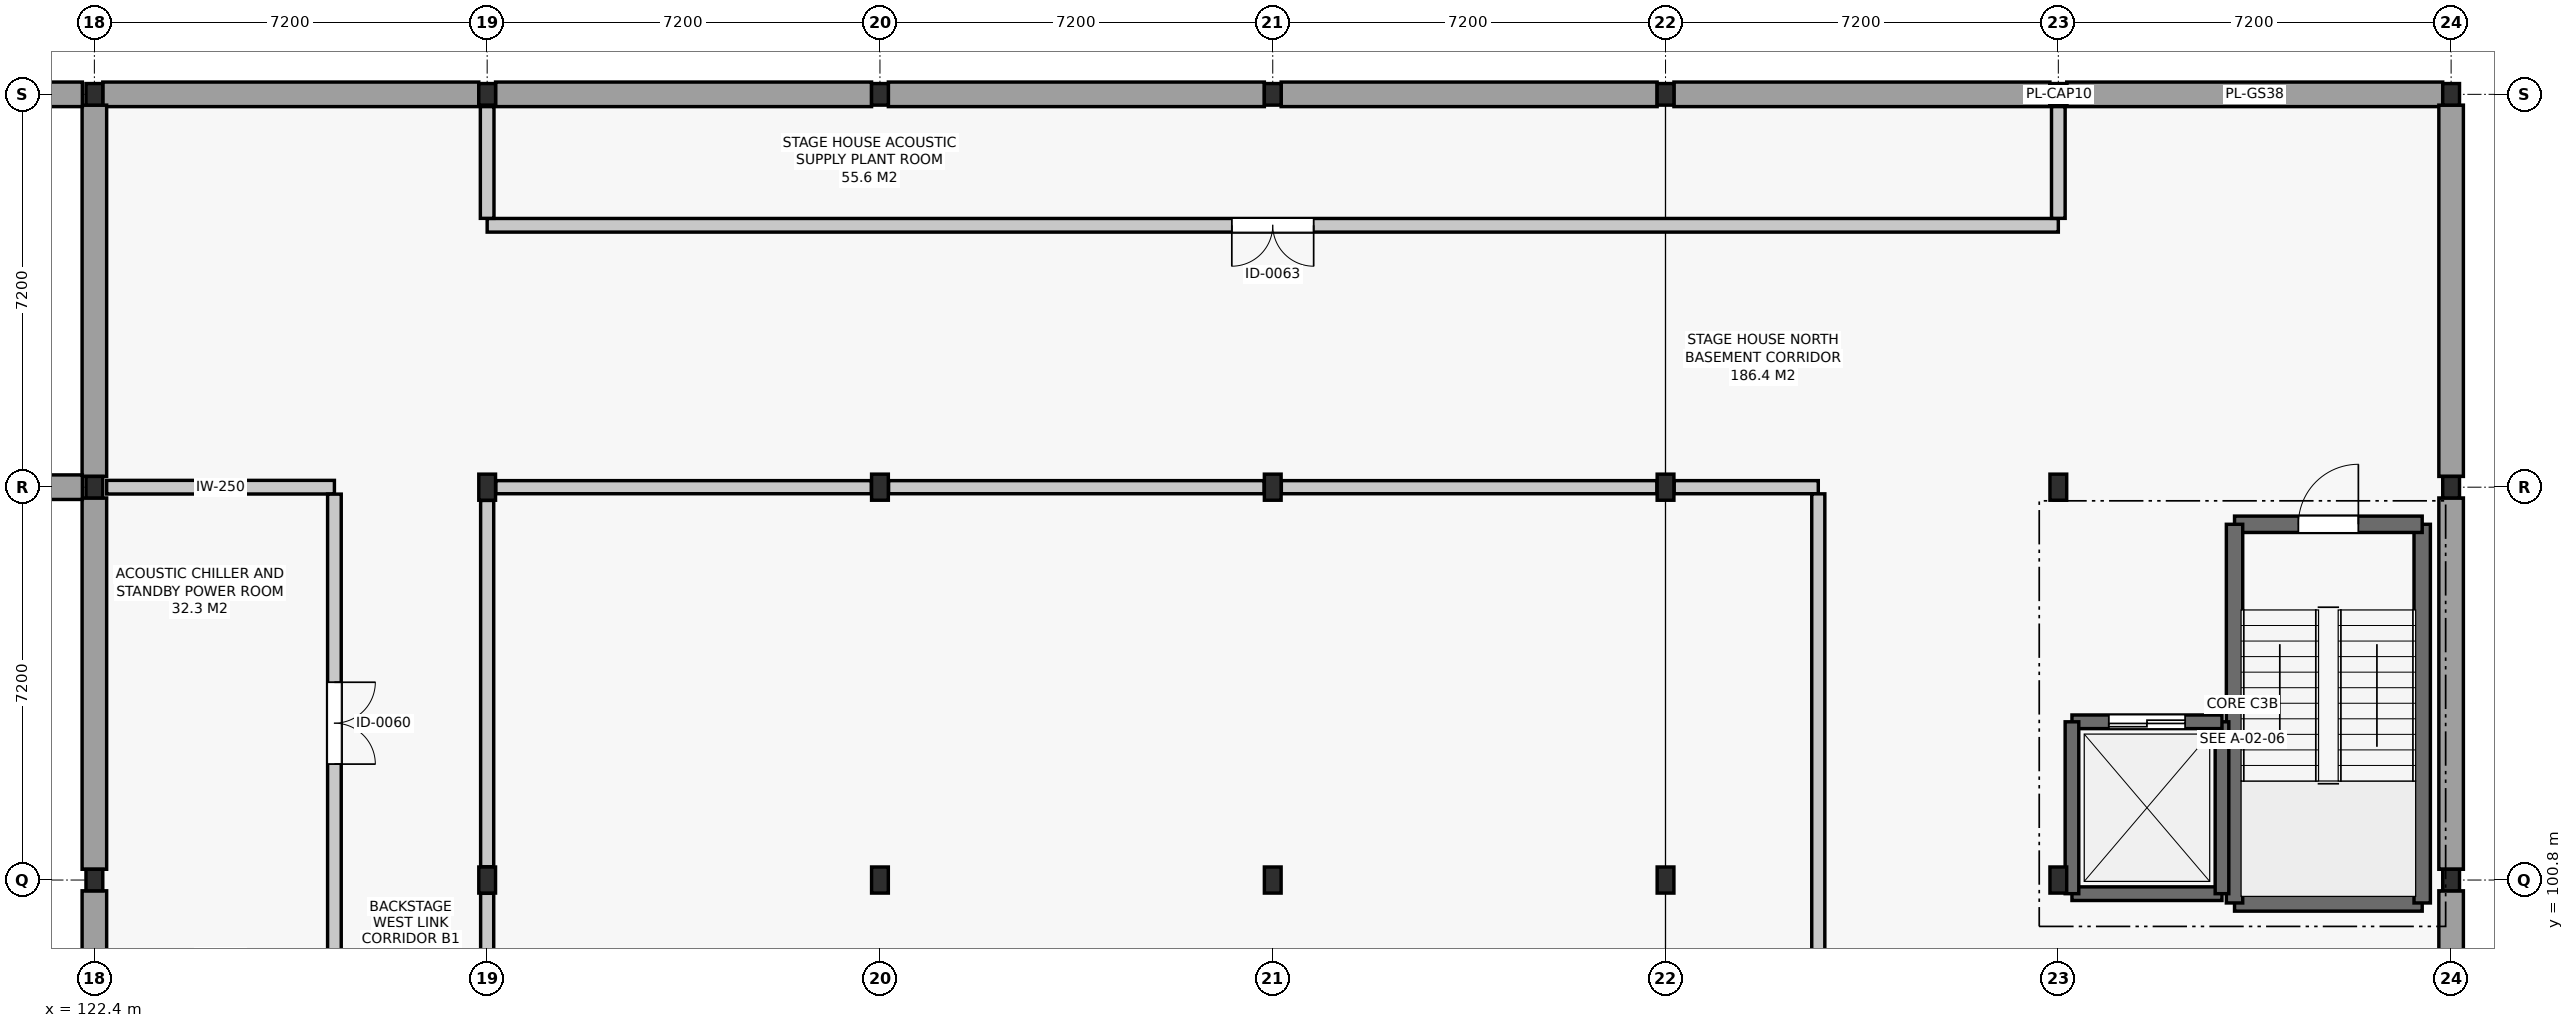
"""IFC4 building model, lengths in metres.
Left out: names, types, materials, properties, quantities, classifications, styles, units other than length and angle.
Written with IfcOpenShell. Run it as: python <this file> out.ifc"""

import sys

from ifc_helpers import new_model, si_unit, direction, frame, frame_2d, origin, origin_2d, place, context, subcontext, project, spatial, rectangle, i_section, extrude, element, fill, save


model = new_model("IFC4")
c1 = context("Model", 3, precision=1e-05, world=origin(), true_north=direction((0.0, 1.0)))
c2 = subcontext(c1, "Body", "Model", "MODEL_VIEW")
j1 = project(units=[si_unit("LENGTHUNIT", "METRE"), si_unit("PLANEANGLEUNIT", "RADIAN")], contexts=[c1])
p1 = place(None, origin())
s1 = spatial("IfcSite", under=j1, at=p1, CompositionType="ELEMENT")
p2 = place(p1, origin())
s2 = spatial("IfcBuilding", under=s1, at=p2, CompositionType="ELEMENT")
p3 = place(p2, frame((0.0, 0.0, -4.2)))
s3 = spatial("IfcBuildingStorey", under=s2, at=p3, CompositionType="ELEMENT", Elevation=-4.2)
for number, where, z_axis, x_axis in (
    (1, (122.4, 100.8, 0.0), (0.0, 0.0, 1.0), (1.0, 0.0, 0.0)),
    (2, (122.4, 108.0, 0.0), (0.0, 0.0, 1.0), (1.0, 0.0, 0.0)),
    (3, (122.4, 115.2, 0.0), (0.0, 0.0, 1.0), (1.0, 0.0, 0.0)),
):
    element("IfcColumn", number, at=place(p3, frame(where, z_axis=z_axis, x_axis=x_axis)), inside=s3, PredefinedType="COLUMN", context=c2, shape_type="SweptSolid", body=[
        extrude(i_section(OverallWidth=0.308, OverallDepth=0.395, WebThickness=0.021, FlangeThickness=0.036, FilletRadius=0.027, at=origin_2d()), origin(), (0.0, 0.0, 1.0), 4.2),
    ])
for number, where, z_axis, x_axis in (
    (4, (129.6, 100.8, 0.0), (0.0, 0.0, 1.0), (1.0, 0.0, 0.0)),
    (5, (129.6, 108.0, 0.0), (0.0, 0.0, 1.0), (1.0, 0.0, 0.0)),
):
    element("IfcColumn", number, at=place(p3, frame(where, z_axis=z_axis, x_axis=x_axis)), inside=s3, PredefinedType="COLUMN", context=c2, shape_type="SweptSolid", body=[
        extrude(i_section(OverallWidth=0.307, OverallDepth=0.478, WebThickness=0.021, FlangeThickness=0.04, FilletRadius=0.027, at=origin_2d()), origin(), (0.0, 0.0, 1.0), 4.2),
    ])
p4 = place(p3, frame((129.6, 115.2, 0.0), z_axis=(0.0, 0.0, 1.0), x_axis=(1.0, 0.0, 0.0)))
e6 = element("IfcColumn", 6, at=p4, inside=s3, PredefinedType="COLUMN", context=c2, shape_type="SweptSolid", body=[
    extrude(i_section(OverallWidth=0.308, OverallDepth=0.395, WebThickness=0.021, FlangeThickness=0.036, FilletRadius=0.027, at=origin_2d()), origin(), (0.0, 0.0, 1.0), 4.2),
])
for number, where, z_axis, x_axis in (
    (7, (136.8, 100.8, 0.0), (0.0, 0.0, 1.0), (1.0, 0.0, 0.0)),
    (8, (136.8, 108.0, 0.0), (0.0, 0.0, 1.0), (1.0, 0.0, 0.0)),
):
    element("IfcColumn", number, at=place(p3, frame(where, z_axis=z_axis, x_axis=x_axis)), inside=s3, PredefinedType="COLUMN", context=c2, shape_type="SweptSolid", body=[
        extrude(i_section(OverallWidth=0.307, OverallDepth=0.478, WebThickness=0.021, FlangeThickness=0.04, FilletRadius=0.027, at=origin_2d()), origin(), (0.0, 0.0, 1.0), 4.2),
    ])
p5 = place(p3, frame((136.8, 115.2, 0.0), z_axis=(0.0, 0.0, 1.0), x_axis=(1.0, 0.0, 0.0)))
e9 = element("IfcColumn", 9, at=p5, inside=s3, PredefinedType="COLUMN", context=c2, shape_type="SweptSolid", body=[
    extrude(i_section(OverallWidth=0.308, OverallDepth=0.395, WebThickness=0.021, FlangeThickness=0.036, FilletRadius=0.027, at=origin_2d()), origin(), (0.0, 0.0, 1.0), 4.2),
])
for number, where, z_axis, x_axis in (
    (10, (144.0, 100.8, 0.0), (0.0, 0.0, 1.0), (1.0, 0.0, 0.0)),
    (11, (144.0, 108.0, 0.0), (0.0, 0.0, 1.0), (1.0, 0.0, 0.0)),
):
    element("IfcColumn", number, at=place(p3, frame(where, z_axis=z_axis, x_axis=x_axis)), inside=s3, PredefinedType="COLUMN", context=c2, shape_type="SweptSolid", body=[
        extrude(i_section(OverallWidth=0.307, OverallDepth=0.478, WebThickness=0.021, FlangeThickness=0.04, FilletRadius=0.027, at=origin_2d()), origin(), (0.0, 0.0, 1.0), 4.2),
    ])
p6 = place(p3, frame((144.0, 115.2, 0.0), z_axis=(0.0, 0.0, 1.0), x_axis=(1.0, 0.0, 0.0)))
e12 = element("IfcColumn", 12, at=p6, inside=s3, PredefinedType="COLUMN", context=c2, shape_type="SweptSolid", body=[
    extrude(i_section(OverallWidth=0.308, OverallDepth=0.395, WebThickness=0.021, FlangeThickness=0.036, FilletRadius=0.027, at=origin_2d()), origin(), (0.0, 0.0, 1.0), 4.2),
])
for number, where, z_axis, x_axis in (
    (13, (151.2, 100.8, 0.0), (0.0, 0.0, 1.0), (1.0, 0.0, 0.0)),
    (14, (151.2, 108.0, 0.0), (0.0, 0.0, 1.0), (1.0, 0.0, 0.0)),
):
    element("IfcColumn", number, at=place(p3, frame(where, z_axis=z_axis, x_axis=x_axis)), inside=s3, PredefinedType="COLUMN", context=c2, shape_type="SweptSolid", body=[
        extrude(i_section(OverallWidth=0.307, OverallDepth=0.478, WebThickness=0.021, FlangeThickness=0.04, FilletRadius=0.027, at=origin_2d()), origin(), (0.0, 0.0, 1.0), 4.2),
    ])
p7 = place(p3, frame((151.2, 115.2, 0.0), z_axis=(0.0, 0.0, 1.0), x_axis=(1.0, 0.0, 0.0)))
e15 = element("IfcColumn", 15, at=p7, inside=s3, PredefinedType="COLUMN", context=c2, shape_type="SweptSolid", body=[
    extrude(i_section(OverallWidth=0.308, OverallDepth=0.395, WebThickness=0.021, FlangeThickness=0.036, FilletRadius=0.027, at=origin_2d()), origin(), (0.0, 0.0, 1.0), 4.2),
])
for number, where, z_axis, x_axis in (
    (16, (158.4, 100.8, 0.0), (0.0, 0.0, 1.0), (1.0, 0.0, 0.0)),
    (17, (158.4, 108.0, 0.0), (0.0, 0.0, 1.0), (1.0, 0.0, 0.0)),
):
    element("IfcColumn", number, at=place(p3, frame(where, z_axis=z_axis, x_axis=x_axis)), inside=s3, PredefinedType="COLUMN", context=c2, shape_type="SweptSolid", body=[
        extrude(i_section(OverallWidth=0.307, OverallDepth=0.478, WebThickness=0.021, FlangeThickness=0.04, FilletRadius=0.027, at=origin_2d()), origin(), (0.0, 0.0, 1.0), 4.2),
    ])
for number, where, z_axis, x_axis in (
    (18, (158.4, 115.2, 0.0), (0.0, 0.0, 1.0), (1.0, 0.0, 0.0)),
    (19, (165.6, 100.8, 0.0), (0.0, 0.0, 1.0), (1.0, 0.0, 0.0)),
    (20, (165.6, 108.0, 0.0), (0.0, 0.0, 1.0), (1.0, 0.0, 0.0)),
    (21, (165.6, 115.2, 0.0), (0.0, 0.0, 1.0), (1.0, 0.0, 0.0)),
):
    element("IfcColumn", number, at=place(p3, frame(where, z_axis=z_axis, x_axis=x_axis)), inside=s3, PredefinedType="COLUMN", context=c2, shape_type="SweptSolid", body=[
        extrude(i_section(OverallWidth=0.308, OverallDepth=0.395, WebThickness=0.021, FlangeThickness=0.036, FilletRadius=0.027, at=origin_2d()), origin(), (0.0, 0.0, 1.0), 4.2),
    ])
for number, where, z_axis, x_axis in (
    (22, (122.554, 115.2, 0.0), (0.0, 0.0, 1.0), (1.0, 0.0, 0.0)),
    (23, (129.754, 115.2, 0.0), (0.0, 0.0, 1.0), (1.0, 0.0, 0.0)),
):
    element("IfcWall", number, at=place(p3, frame(where, z_axis=z_axis, x_axis=x_axis)), inside=s3, PredefinedType="USERDEFINED", context=c2, shape_type="SweptSolid", body=[
        extrude(rectangle(XDim=6.892, YDim=0.45, at=frame_2d((3.446, 0.0))), origin(), (0.0, 0.0, 1.0), 3.26),
    ])
for number, where, z_axis, x_axis in (
    (24, (136.954, 115.2, 0.0), (0.0, 0.0, 1.0), (1.0, 0.0, 0.0)),
    (25, (144.154, 115.2, 0.0), (0.0, 0.0, 1.0), (1.0, 0.0, 0.0)),
):
    element("IfcWall", number, at=place(p3, frame(where, z_axis=z_axis, x_axis=x_axis)), inside=s3, PredefinedType="USERDEFINED", context=c2, shape_type="SweptSolid", body=[
        extrude(rectangle(XDim=6.892, YDim=0.45, at=frame_2d((3.446, 0.0))), origin(), (0.0, 0.0, 1.0), 3.26),
    ])
for number, where, z_axis, x_axis in (
    (26, (151.354, 115.2, 0.0), (0.0, 0.0, 1.0), (1.0, 0.0, 0.0)),
    (27, (158.554, 115.2, 0.0), (0.0, 0.0, 1.0), (1.0, 0.0, 0.0)),
):
    element("IfcWall", number, at=place(p3, frame(where, z_axis=z_axis, x_axis=x_axis)), inside=s3, PredefinedType="USERDEFINED", context=c2, shape_type="SweptSolid", body=[
        extrude(rectangle(XDim=6.892, YDim=0.45, at=frame_2d((3.446, 0.0))), origin(), (0.0, 0.0, 1.0), 3.26),
    ])
for number, where, z_axis, x_axis in (
    (28, (122.4, 93.798, 0.0), (0.0, 0.0, 1.0), (0.0, 1.0, 0.0)),
    (29, (165.6, 93.798, 0.0), (0.0, 0.0, 1.0), (0.0, 1.0, 0.0)),
    (30, (122.4, 100.998, 0.0), (0.0, 0.0, 1.0), (0.0, 1.0, 0.0)),
    (31, (165.6, 100.998, 0.0), (0.0, 0.0, 1.0), (0.0, 1.0, 0.0)),
    (32, (122.4, 108.198, 0.0), (0.0, 0.0, 1.0), (0.0, 1.0, 0.0)),
    (33, (165.6, 108.198, 0.0), (0.0, 0.0, 1.0), (0.0, 1.0, 0.0)),
):
    element("IfcWall", number, at=place(p3, frame(where, z_axis=z_axis, x_axis=x_axis)), inside=s3, PredefinedType="USERDEFINED", context=c2, shape_type="SweptSolid", body=[
        extrude(rectangle(XDim=6.805, YDim=0.45, at=frame_2d((3.402, 0.0))), origin(), (0.0, 0.0, 1.0), 3.26),
    ])
p8 = place(p3, frame((57.82, 115.2, 0.0), z_axis=(0.0, 0.0, 1.0), x_axis=(1.0, 0.0, 0.0)))
e34 = element("IfcWall", 34, at=p8, inside=s3, PredefinedType="USERDEFINED", context=c2, shape_type="SweptSolid", body=[
    extrude(rectangle(XDim=64.36, YDim=0.45, at=frame_2d((32.18, 0.0))), origin(), (0.0, 0.0, 1.0), 3.295),
])
p9 = place(p3, frame((57.82, 108.0, 0.0), z_axis=(0.0, 0.0, 1.0), x_axis=(1.0, 0.0, 0.0)))
e35 = element("IfcWall", 35, at=p9, inside=s3, PredefinedType="USERDEFINED", context=c2, shape_type="SweptSolid", body=[
    extrude(rectangle(XDim=64.36, YDim=0.45, at=frame_2d((32.18, 0.0))), origin(), (0.0, 0.0, 1.0), 3.98),
])
p10 = place(p3, frame((161.63, 100.38, 0.0), z_axis=(0.0, 0.0, 1.0), x_axis=(1.0, 0.0, 0.0)))
e36 = element("IfcWall", 36, at=p10, inside=s3, PredefinedType="SHEAR", context=c2, shape_type="SweptSolid", body=[
    extrude(rectangle(XDim=3.44, YDim=0.3, at=frame_2d((1.72, 0.0))), origin(), (0.0, 0.0, 1.0), 3.88),
])
p11 = place(p3, frame((165.07, 100.38, 0.0), z_axis=(0.0, 0.0, 1.0), x_axis=(0.0, 1.0, 0.0)))
e37 = element("IfcWall", 37, at=p11, inside=s3, PredefinedType="SHEAR", context=c2, shape_type="SweptSolid", body=[
    extrude(rectangle(XDim=6.94, YDim=0.3, at=frame_2d((3.47, 0.0))), origin(), (0.0, 0.0, 1.0), 3.88),
])
p12 = place(p3, frame((165.07, 107.32, 0.0), z_axis=(0.0, 0.0, 1.0), x_axis=(-1.0, 0.0, 0.0)))
e38 = element("IfcWall", 38, at=p12, inside=s3, PredefinedType="SHEAR", context=c2, shape_type="SweptSolid", body=[
    extrude(rectangle(XDim=3.44, YDim=0.3, at=frame_2d((1.72, 0.0))), origin(), (0.0, 0.0, 1.0), 3.88),
])
p13 = place(p12, frame((1.17, 0.0, 0.0)))
e39 = element("IfcOpeningElement", 39, at=p13, cuts=e38, PredefinedType="OPENING", context=c2, shape_type="SweptSolid", body=[
    extrude(rectangle(XDim=1.1, YDim=2.15, at=frame_2d((0.55, 1.075))), frame((0.0, 0.162, 0.0), z_axis=(0.0, -1.0, 0.0), x_axis=(1.0, 0.0, 0.0)), (0.0, 0.0, 1.0), 0.324),
])
p14 = place(p3, frame((161.63, 107.32, 0.0), z_axis=(0.0, 0.0, 1.0), x_axis=(0.0, -1.0, 0.0)))
e40 = element("IfcWall", 40, at=p14, inside=s3, PredefinedType="SHEAR", context=c2, shape_type="SweptSolid", body=[
    extrude(rectangle(XDim=6.94, YDim=0.3, at=frame_2d((3.47, 0.0))), origin(), (0.0, 0.0, 1.0), 3.88),
])
p15 = place(p3, frame((158.65, 100.55, 0.0), z_axis=(0.0, 0.0, 1.0), x_axis=(1.0, 0.0, 0.0)))
e41 = element("IfcWall", 41, at=p15, inside=s3, PredefinedType="SHEAR", context=c2, shape_type="SweptSolid", body=[
    extrude(rectangle(XDim=2.75, YDim=0.25, at=frame_2d((1.375, 0.0))), origin(), (0.0, 0.0, 1.0), 3.88),
])
p16 = place(p3, frame((161.4, 100.55, 0.0), z_axis=(0.0, 0.0, 1.0), x_axis=(0.0, 1.0, 0.0)))
e42 = element("IfcWall", 42, at=p16, inside=s3, PredefinedType="SHEAR", context=c2, shape_type="SweptSolid", body=[
    extrude(rectangle(XDim=3.15, YDim=0.25, at=frame_2d((1.575, 0.0))), origin(), (0.0, 0.0, 1.0), 3.88),
])
p17 = place(p3, frame((161.4, 103.7, 0.0), z_axis=(0.0, 0.0, 1.0), x_axis=(-1.0, 0.0, 0.0)))
e43 = element("IfcWall", 43, at=p17, inside=s3, PredefinedType="SHEAR", context=c2, shape_type="SweptSolid", body=[
    extrude(rectangle(XDim=2.75, YDim=0.25, at=frame_2d((1.375, 0.0))), origin(), (0.0, 0.0, 1.0), 3.88),
])
p18 = place(p17, frame((0.675, 0.0, 0.0)))
e44 = element("IfcOpeningElement", 44, at=p18, cuts=e43, PredefinedType="OPENING", context=c2, shape_type="SweptSolid", body=[
    extrude(rectangle(XDim=1.4, YDim=2.2, at=frame_2d((0.7, 1.1))), frame((0.0, 0.137, 0.0), z_axis=(0.0, -1.0, 0.0), x_axis=(1.0, 0.0, 0.0)), (0.0, 0.0, 1.0), 0.274),
])
p19 = place(p3, frame((158.65, 103.7, 0.0), z_axis=(0.0, 0.0, 1.0), x_axis=(0.0, -1.0, 0.0)))
e45 = element("IfcWall", 45, at=p19, inside=s3, PredefinedType="SHEAR", context=c2, shape_type="SweptSolid", body=[
    extrude(rectangle(XDim=3.15, YDim=0.25, at=frame_2d((1.575, 0.0))), origin(), (0.0, 0.0, 1.0), 3.88),
])
p20 = place(p3, frame((122.625, 108.0, 0.0), z_axis=(0.0, 0.0, 1.0), x_axis=(1.0, 0.0, 0.0)))
e46 = element("IfcWall", 46, at=p20, inside=s3, PredefinedType="SOLIDWALL", context=c2, shape_type="SweptSolid", body=[
    extrude(rectangle(XDim=4.175, YDim=0.25, at=frame_2d((2.087, 0.0))), origin(), (0.0, 0.0, 1.0), 3.375),
])
for number, where, z_axis, x_axis in (
    (47, (129.758, 108.0, 0.0), (0.0, 0.0, 1.0), (1.0, 0.0, 0.0)),
    (48, (136.958, 108.0, 0.0), (0.0, 0.0, 1.0), (1.0, 0.0, 0.0)),
    (49, (144.157, 108.0, 0.0), (0.0, 0.0, 1.0), (1.0, 0.0, 0.0)),
):
    element("IfcWall", number, at=place(p3, frame(where, z_axis=z_axis, x_axis=x_axis)), inside=s3, PredefinedType="SOLIDWALL", context=c2, shape_type="SweptSolid", body=[
        extrude(rectangle(XDim=6.885, YDim=0.24, at=frame_2d((3.442, 0.0))), origin(), (0.0, 0.0, 1.0), 3.375),
    ])
p21 = place(p3, frame((151.357, 108.0, 0.0), z_axis=(0.0, 0.0, 1.0), x_axis=(1.0, 0.0, 0.0)))
e50 = element("IfcWall", 50, at=p21, inside=s3, PredefinedType="SOLIDWALL", context=c2, shape_type="SweptSolid", body=[
    extrude(rectangle(XDim=2.643, YDim=0.24, at=frame_2d((1.321, 0.0))), origin(), (0.0, 0.0, 1.0), 3.375),
])
p22 = place(p3, frame((129.6, 112.8, 0.0), z_axis=(0.0, 0.0, 1.0), x_axis=(1.0, 0.0, 0.0)))
e51 = element("IfcWall", 51, at=p22, inside=s3, PredefinedType="SOLIDWALL", context=c2, shape_type="SweptSolid", body=[
    extrude(rectangle(XDim=28.8, YDim=0.25, at=frame_2d((14.4, 0.0))), origin(), (0.0, 0.0, 1.0), 3.315),
])
p23 = place(p22, frame((13.65, 0.0, 0.0)))
e52 = element("IfcOpeningElement", 52, at=p23, cuts=e51, PredefinedType="OPENING", context=c2, shape_type="SweptSolid", body=[
    extrude(rectangle(XDim=1.5, YDim=2.2, at=frame_2d((0.75, 1.1))), frame((0.0, 0.137, 0.0), z_axis=(0.0, -1.0, 0.0), x_axis=(1.0, 0.0, 0.0)), (0.0, 0.0, 1.0), 0.274),
])
p24 = place(p3, frame((126.8, 99.477, 0.0), z_axis=(0.0, 0.0, 1.0), x_axis=(0.0, 1.0, 0.0)))
e53 = element("IfcWall", 53, at=p24, inside=s3, PredefinedType="SOLIDWALL", context=c2, shape_type="SweptSolid", body=[
    extrude(rectangle(XDim=8.396, YDim=0.25, at=frame_2d((4.198, 0.0))), origin(), (0.0, 0.0, 1.0), 3.375),
])
p25 = place(p24, frame((3.448, 0.0, 0.0)))
e54 = element("IfcOpeningElement", 54, at=p25, cuts=e53, PredefinedType="OPENING", context=c2, shape_type="SweptSolid", body=[
    extrude(rectangle(XDim=1.5, YDim=2.2, at=frame_2d((0.75, 1.1))), frame((0.0, 0.137, 0.0), z_axis=(0.0, -1.0, 0.0), x_axis=(1.0, 0.0, 0.0)), (0.0, 0.0, 1.0), 0.274),
])
p26 = place(p3, frame((129.6, 93.843, 0.0), z_axis=(0.0, 0.0, 1.0), x_axis=(0.0, 1.0, 0.0)))
e55 = element("IfcWall", 55, at=p26, inside=s3, PredefinedType="SOLIDWALL", context=c2, shape_type="SweptSolid", body=[
    extrude(rectangle(XDim=6.714, YDim=0.24, at=frame_2d((3.357, 0.0))), origin(), (0.0, 0.0, 1.0), 3.425),
])
p27 = place(p3, frame((129.6, 101.043, 0.0), z_axis=(0.0, 0.0, 1.0), x_axis=(0.0, 1.0, 0.0)))
e56 = element("IfcWall", 56, at=p27, inside=s3, PredefinedType="SOLIDWALL", context=c2, shape_type="SweptSolid", body=[
    extrude(rectangle(XDim=6.714, YDim=0.24, at=frame_2d((3.357, 0.0))), origin(), (0.0, 0.0, 1.0), 3.425),
])
p28 = place(p3, frame((154.0, 86.522, 0.0), z_axis=(0.0, 0.0, 1.0), x_axis=(0.0, 1.0, 0.0)))
e57 = element("IfcWall", 57, at=p28, inside=s3, PredefinedType="SOLIDWALL", context=c2, shape_type="SweptSolid", body=[
    extrude(rectangle(XDim=21.356, YDim=0.24, at=frame_2d((10.678, 0.0))), origin(), (0.0, 0.0, 1.0), 3.375),
])
p29 = place(p28, frame((9.678, 0.0, 0.0)))
e58 = element("IfcOpeningElement", 58, at=p29, cuts=e57, PredefinedType="OPENING", context=c2, shape_type="SweptSolid", body=[
    extrude(rectangle(XDim=2.0, YDim=2.4, at=frame_2d((1.0, 1.2))), frame((0.0, 0.132, 0.0), z_axis=(0.0, -1.0, 0.0), x_axis=(1.0, 0.0, 0.0)), (0.0, 0.0, 1.0), 0.264),
])
for number, where, z_axis, x_axis in (
    (59, (129.6, 112.927, 0.0), (0.0, 0.0, 1.0), (0.0, 1.0, 0.0)),
    (60, (158.4, 112.927, 0.0), (0.0, 0.0, 1.0), (0.0, 1.0, 0.0)),
):
    element("IfcWall", number, at=place(p3, frame(where, z_axis=z_axis, x_axis=x_axis)), inside=s3, PredefinedType="SOLIDWALL", context=c2, shape_type="SweptSolid", body=[
        extrude(rectangle(XDim=2.048, YDim=0.25, at=frame_2d((1.024, 0.0))), origin(), (0.0, 0.0, 1.0), 3.425),
    ])
p30 = place(p13, frame((1.1, 0.0, 0.0), z_axis=(0.0, 0.0, 1.0), x_axis=(-1.0, 0.0, 0.0)))
e61 = element("IfcDoor", 61, at=p30, inside=s3, OperationType="SINGLE_SWING_RIGHT", PredefinedType="DOOR", context=c2, shape_type="SweptSolid", body=[
    extrude(rectangle(XDim=1.1, YDim=2.15, at=frame_2d((0.55, 1.075))), frame((0.0, 0.025, 0.0), z_axis=(0.0, -1.0, 0.0), x_axis=(1.0, 0.0, 0.0)), (0.0, 0.0, 1.0), 0.05),
])
fill(e39, e61)
p31 = place(p18, origin())
e62 = element("IfcDoor", 62, at=p31, inside=s3, OperationType="DOUBLE_DOOR_SLIDING", PredefinedType="DOOR", context=c2, shape_type="SweptSolid", body=[
    extrude(rectangle(XDim=1.4, YDim=2.2, at=frame_2d((0.7, 1.1))), frame((0.0, 0.025, 0.0), z_axis=(0.0, -1.0, 0.0), x_axis=(1.0, 0.0, 0.0)), (0.0, 0.0, 1.0), 0.05),
])
fill(e44, e62)
p32 = place(p25, frame((1.5, 0.0, 0.0), z_axis=(0.0, 0.0, 1.0), x_axis=(-1.0, 0.0, 0.0)))
e63 = element("IfcDoor", 63, at=p32, inside=s3, OperationType="DOUBLE_DOOR_SINGLE_SWING", PredefinedType="DOOR", context=c2, shape_type="SweptSolid", body=[
    extrude(rectangle(XDim=1.5, YDim=2.2, at=frame_2d((0.75, 1.1))), frame((0.0, 0.025, 0.0), z_axis=(0.0, -1.0, 0.0), x_axis=(1.0, 0.0, 0.0)), (0.0, 0.0, 1.0), 0.05),
])
fill(e54, e63)
p33 = place(p23, frame((1.5, 0.0, 0.0), z_axis=(0.0, 0.0, 1.0), x_axis=(-1.0, 0.0, 0.0)))
e64 = element("IfcDoor", 64, at=p33, inside=s3, OperationType="DOUBLE_DOOR_SINGLE_SWING", PredefinedType="DOOR", context=c2, shape_type="SweptSolid", body=[
    extrude(rectangle(XDim=1.5, YDim=2.2, at=frame_2d((0.75, 1.1))), frame((0.0, 0.025, 0.0), z_axis=(0.0, -1.0, 0.0), x_axis=(1.0, 0.0, 0.0)), (0.0, 0.0, 1.0), 0.05),
])
fill(e52, e64)
save(model, sys.argv[1])
